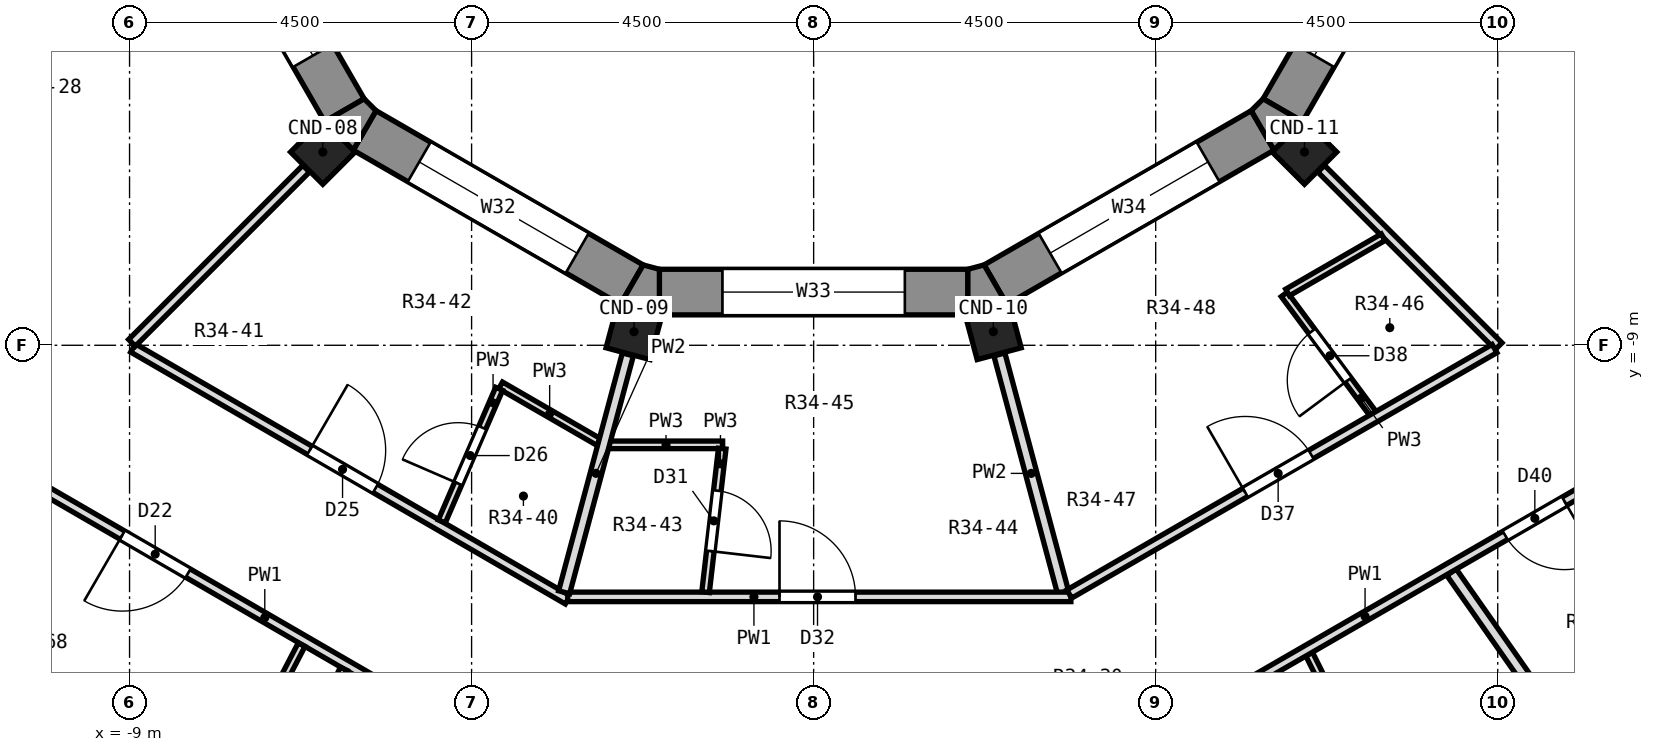
"""IFC4 building model, lengths in metres.
Left out: names, types, materials, properties, quantities, classifications, styles, units other than length and angle.
Written with IfcOpenShell. Run it as: python <this file> out.ifc"""

import sys

from ifc_helpers import new_model, si_unit, direction, frame, frame_2d, origin, origin_2d, place, context, subcontext, project, spatial, polyline, rectangle, outline, extrude, element, fill, save


model = new_model("IFC4")
c1 = context("Model", 3, precision=1e-05, world=origin(), true_north=direction((0.0, 1.0)))
c2 = subcontext(c1, "Body", "Model", "MODEL_VIEW")
j1 = project(units=[si_unit("LENGTHUNIT", "METRE"), si_unit("PLANEANGLEUNIT", "RADIAN")], contexts=[c1])
p1 = place(None, origin())
s1 = spatial("IfcSite", under=j1, at=p1, CompositionType="ELEMENT")
p2 = place(p1, origin())
s2 = spatial("IfcBuilding", under=s1, at=p2, CompositionType="ELEMENT")
p3 = place(p2, frame((0.0, 0.0, 239.6)))
s3 = spatial("IfcBuildingStorey", under=s2, at=p3, CompositionType="ELEMENT", Elevation=239.6)
for number, where, z_axis, x_axis in (
    (1, (-6.458, -6.458, 0.0), (0.0, 0.0, 1.0), (-0.707, -0.707, 0.0)),
    (2, (-2.364, -8.821, 0.0), (0.0, 0.0, 1.0), (-0.259, -0.966, 0.0)),
    (3, (2.364, -8.821, 0.0), (0.0, 0.0, 1.0), (0.259, -0.966, 0.0)),
    (4, (6.458, -6.458, 0.0), (0.0, 0.0, 1.0), (0.707, -0.707, 0.0)),
):
    element("IfcColumn", number, at=place(p3, frame(where, z_axis=z_axis, x_axis=x_axis)), inside=s3, PredefinedType="COLUMN", context=c2, shape_type="SweptSolid", body=[
        extrude(rectangle(XDim=0.6, YDim=0.6, at=origin_2d()), origin(), (0.0, 0.0, 1.0), 3.3),
    ])
p4 = place(p3, frame((-8.203, -2.393, 0.0), z_axis=(0.0, 0.0, 1.0), x_axis=(0.499994954979, -0.866028316509, 0.0)))
e5 = element("IfcWall", 5, at=p4, inside=s3, PredefinedType="SOLIDWALL", context=c2, shape_type="SweptSolid", body=[
    extrude(rectangle(XDim=4.059, YDim=0.6, at=frame_2d((2.029, 0.0))), origin(), (0.0, 0.0, 1.0), 2.9),
])
p5 = place(p4, frame((0.829, 0.0, 0.9)))
e6 = element("IfcOpeningElement", 6, at=p5, cuts=e5, PredefinedType="OPENING", context=c2, shape_type="SweptSolid", body=[
    extrude(rectangle(XDim=2.4, YDim=1.8, at=frame_2d((1.2, 0.9))), frame((0.0, 0.312, 0.0), z_axis=(0.0, -1.0, 0.0), x_axis=(1.0, 0.0, 0.0)), (0.0, 0.0, 1.0), 0.624),
])
p6 = place(p3, frame((-5.907, -6.173, 0.0), z_axis=(0.0, 0.0, 1.0), x_axis=(0.866028316509, -0.499994954979, 0.0)))
e7 = element("IfcWall", 7, at=p6, inside=s3, PredefinedType="SOLIDWALL", context=c2, shape_type="SweptSolid", body=[
    extrude(rectangle(XDim=4.059, YDim=0.6, at=frame_2d((2.029, 0.0))), origin(), (0.0, 0.0, 1.0), 2.9),
])
p7 = place(p6, frame((0.829, 0.0, 0.9)))
e8 = element("IfcOpeningElement", 8, at=p7, cuts=e7, PredefinedType="OPENING", context=c2, shape_type="SweptSolid", body=[
    extrude(rectangle(XDim=2.4, YDim=1.8, at=frame_2d((1.2, 0.9))), frame((0.0, 0.312, 0.0), z_axis=(0.0, -1.0, 0.0), x_axis=(1.0, 0.0, 0.0)), (0.0, 0.0, 1.0), 0.624),
])
p8 = place(p3, frame((-2.029, -8.3, 0.0), z_axis=(0.0, 0.0, 1.0), x_axis=(1.0, 0.0, 0.0)))
e9 = element("IfcWall", 9, at=p8, inside=s3, PredefinedType="SOLIDWALL", context=c2, shape_type="SweptSolid", body=[
    extrude(rectangle(XDim=4.059, YDim=0.6, at=frame_2d((2.029, 0.0))), origin(), (0.0, 0.0, 1.0), 2.9),
])
p9 = place(p8, frame((0.829, 0.0, 0.9)))
e10 = element("IfcOpeningElement", 10, at=p9, cuts=e9, PredefinedType="OPENING", context=c2, shape_type="SweptSolid", body=[
    extrude(rectangle(XDim=2.4, YDim=1.8, at=frame_2d((1.2, 0.9))), frame((0.0, 0.312, 0.0), z_axis=(0.0, -1.0, 0.0), x_axis=(1.0, 0.0, 0.0)), (0.0, 0.0, 1.0), 0.624),
])
p10 = place(p3, frame((2.393, -8.203, 0.0), z_axis=(0.0, 0.0, 1.0), x_axis=(0.866028316509, 0.499994954979, 0.0)))
e11 = element("IfcWall", 11, at=p10, inside=s3, PredefinedType="SOLIDWALL", context=c2, shape_type="SweptSolid", body=[
    extrude(rectangle(XDim=4.059, YDim=0.6, at=frame_2d((2.029, 0.0))), origin(), (0.0, 0.0, 1.0), 2.9),
])
p11 = place(p10, frame((0.829, 0.0, 0.9)))
e12 = element("IfcOpeningElement", 12, at=p11, cuts=e11, PredefinedType="OPENING", context=c2, shape_type="SweptSolid", body=[
    extrude(rectangle(XDim=2.4, YDim=1.8, at=frame_2d((1.2, 0.9))), frame((0.0, 0.312, 0.0), z_axis=(0.0, -1.0, 0.0), x_axis=(1.0, 0.0, 0.0)), (0.0, 0.0, 1.0), 0.624),
])
p12 = place(p3, frame((6.173, -5.907, 0.0), z_axis=(0.0, 0.0, 1.0), x_axis=(0.499994954979, 0.866028316509, 0.0)))
e13 = element("IfcWall", 13, at=p12, inside=s3, PredefinedType="SOLIDWALL", context=c2, shape_type="SweptSolid", body=[
    extrude(rectangle(XDim=4.059, YDim=0.6, at=frame_2d((2.029, 0.0))), origin(), (0.0, 0.0, 1.0), 2.9),
])
p13 = place(p12, frame((0.829, 0.0, 0.9)))
e14 = element("IfcOpeningElement", 14, at=p13, cuts=e13, PredefinedType="OPENING", context=c2, shape_type="SweptSolid", body=[
    extrude(rectangle(XDim=2.4, YDim=1.8, at=frame_2d((1.2, 0.9))), frame((0.0, 0.312, 0.0), z_axis=(0.0, -1.0, 0.0), x_axis=(1.0, 0.0, 0.0)), (0.0, 0.0, 1.0), 0.624),
])
p14 = place(p3, origin())
e15 = element("IfcWall", 15, at=p14, inside=s3, PredefinedType="SOLIDWALL", context=c2, shape_type="SweptSolid", body=[
    extrude(outline(polyline([(-6.058, -6.433), (-5.758, -5.914), (-5.914, -5.758), (-6.433, -6.058), (-6.058, -6.433)])), origin(), (0.0, 0.0, 1.0), 2.9),
])
p15 = place(p3, origin())
e16 = element("IfcWall", 16, at=p15, inside=s3, PredefinedType="SOLIDWALL", context=c2, shape_type="SweptSolid", body=[
    extrude(outline(polyline([(-2.029, -8.6), (-2.029, -8.0), (-2.242, -7.943), (-2.542, -8.462), (-2.029, -8.6)])), origin(), (0.0, 0.0, 1.0), 2.9),
])
p16 = place(p3, origin())
e17 = element("IfcWall", 17, at=p16, inside=s3, PredefinedType="SOLIDWALL", context=c2, shape_type="SweptSolid", body=[
    extrude(outline(polyline([(2.542, -8.462), (2.242, -7.943), (2.029, -8.0), (2.029, -8.6), (2.542, -8.462)])), origin(), (0.0, 0.0, 1.0), 2.9),
])
p17 = place(p3, origin())
e18 = element("IfcWall", 18, at=p17, inside=s3, PredefinedType="SOLIDWALL", context=c2, shape_type="SweptSolid", body=[
    extrude(outline(polyline([(6.433, -6.058), (5.914, -5.758), (5.758, -5.914), (6.058, -6.433), (6.433, -6.058)])), origin(), (0.0, 0.0, 1.0), 2.9),
])
p18 = place(p3, frame((2.444, -9.121, 0.0), z_axis=(0.0, 0.0, 1.0), x_axis=(0.258356832743, -0.966049557205, 0.0)))
e19 = element("IfcWall", 19, at=p18, inside=s3, PredefinedType="PARTITIONING", context=c2, shape_type="SweptSolid", body=[
    extrude(rectangle(XDim=3.239, YDim=0.15, at=frame_2d((1.62, 0.0))), origin(), (0.0, 0.0, 1.0), 2.9),
])
p19 = place(p3, frame((6.519, -13.063, 0.0), z_axis=(0.0, 0.0, 1.0), x_axis=(0.446207639569, -0.894929462243, 0.0)))
e20 = element("IfcWall", 20, at=p19, inside=s3, PredefinedType="PARTITIONING", context=c2, shape_type="SweptSolid", body=[
    extrude(rectangle(XDim=2.039, YDim=0.1, at=frame_2d((1.02, 0.0))), origin(), (0.0, 0.0, 1.0), 2.9),
])
p20 = place(p3, frame((8.392, -11.985, 0.0), z_axis=(0.0, 0.0, 1.0), x_axis=(0.573619710388, -0.819121741779, 0.0)))
e21 = element("IfcWall", 21, at=p20, inside=s3, PredefinedType="PARTITIONING", context=c2, shape_type="SweptSolid", body=[
    extrude(rectangle(XDim=7.184, YDim=0.15, at=frame_2d((3.592, 0.0))), origin(), (0.0, 0.0, 1.0), 2.9),
])
p21 = place(p3, frame((6.192, -8.33, 0.0), z_axis=(0.0, 0.0, 1.0), x_axis=(0.596570512615, -0.802560666541, 0.0)))
e22 = element("IfcWall", 22, at=p21, inside=s3, PredefinedType="PARTITIONING", context=c2, shape_type="SweptSolid", body=[
    extrude(rectangle(XDim=1.951, YDim=0.1, at=frame_2d((0.976, 0.0))), origin(), (0.0, 0.0, 1.0), 2.9),
])
p22 = place(p21, frame((0.607, 0.0, 0.0)))
e23 = element("IfcOpeningElement", 23, at=p22, cuts=e22, PredefinedType="OPENING", context=c2, shape_type="SweptSolid", body=[
    extrude(rectangle(XDim=0.8, YDim=2.1, at=frame_2d((0.4, 1.05))), frame((0.0, 0.062, 0.0), z_axis=(0.0, -1.0, 0.0), x_axis=(1.0, 0.0, 0.0)), (0.0, 0.0, 1.0), 0.124),
])
p23 = place(p3, frame((6.677, -6.677, 0.0), z_axis=(0.0, 0.0, 1.0), x_axis=(0.707106781187, -0.707106781187, 0.0)))
e24 = element("IfcWall", 24, at=p23, inside=s3, PredefinedType="PARTITIONING", context=c2, shape_type="SweptSolid", body=[
    extrude(rectangle(XDim=3.302, YDim=0.125, at=frame_2d((1.651, 0.0))), origin(), (0.0, 0.0, 1.0), 2.9),
])
p24 = place(p3, frame((-10.618, -10.615, 0.0), z_axis=(0.0, 0.0, 1.0), x_axis=(0.865323364785, -0.501214000561, 0.0)))
e25 = element("IfcWall", 25, at=p24, inside=s3, PredefinedType="PARTITIONING", context=c2, shape_type="SweptSolid", body=[
    extrude(rectangle(XDim=7.851, YDim=0.125, at=frame_2d((3.926, 0.0))), origin(), (0.0, 0.0, 1.0), 2.9),
])
p25 = place(p24, frame((1.76, 0.0, 0.0)))
e26 = element("IfcOpeningElement", 26, at=p25, cuts=e25, PredefinedType="OPENING", context=c2, shape_type="SweptSolid", body=[
    extrude(rectangle(XDim=1.0, YDim=2.1, at=frame_2d((0.5, 1.05))), frame((0.0, 0.074, 0.0), z_axis=(0.0, -1.0, 0.0), x_axis=(1.0, 0.0, 0.0)), (0.0, 0.0, 1.0), 0.149),
])
p26 = place(p3, frame((-8.953, -9.036, 0.0), z_axis=(0.0, 0.0, 1.0), x_axis=(0.865185064951, -0.501452693068, 0.0)))
e27 = element("IfcWall", 27, at=p26, inside=s3, PredefinedType="PARTITIONING", context=c2, shape_type="SweptSolid", body=[
    extrude(rectangle(XDim=6.609, YDim=0.125, at=frame_2d((3.304, 0.0))), origin(), (0.0, 0.0, 1.0), 2.9),
])
p27 = place(p26, frame((2.685, 0.0, 0.0)))
e28 = element("IfcOpeningElement", 28, at=p27, cuts=e27, PredefinedType="OPENING", context=c2, shape_type="SweptSolid", body=[
    extrude(rectangle(XDim=1.0, YDim=2.1, at=frame_2d((0.5, 1.05))), frame((0.0, 0.074, 0.0), z_axis=(0.0, -1.0, 0.0), x_axis=(1.0, 0.0, 0.0)), (0.0, 0.0, 1.0), 0.149),
])
p28 = place(p3, frame((-4.118, -9.527, 0.0), z_axis=(0.0, 0.0, 1.0), x_axis=(0.865863495864, -0.500280327947, 0.0)))
e29 = element("IfcWall", 29, at=p28, inside=s3, PredefinedType="PARTITIONING", context=c2, shape_type="SweptSolid", body=[
    extrude(rectangle(XDim=1.49, YDim=0.1, at=frame_2d((0.745, 0.0))), origin(), (0.0, 0.0, 1.0), 2.9),
])
p29 = place(p3, frame((-3.236, -12.31, 0.0), z_axis=(0.0, 0.0, 1.0), x_axis=(1.0, 0.0, 0.0)))
e30 = element("IfcWall", 30, at=p29, inside=s3, PredefinedType="PARTITIONING", context=c2, shape_type="SweptSolid", body=[
    extrude(rectangle(XDim=6.62, YDim=0.125, at=frame_2d((3.31, 0.0))), origin(), (0.0, 0.0, 1.0), 2.9),
])
p30 = place(p29, frame((2.787, 0.0, 0.0)))
e31 = element("IfcOpeningElement", 31, at=p30, cuts=e30, PredefinedType="OPENING", context=c2, shape_type="SweptSolid", body=[
    extrude(rectangle(XDim=1.0, YDim=2.1, at=frame_2d((0.5, 1.05))), frame((0.0, 0.074, 0.0), z_axis=(0.0, -1.0, 0.0), x_axis=(1.0, 0.0, 0.0)), (0.0, 0.0, 1.0), 0.149),
])
p31 = place(p3, frame((-2.688, -10.31, 0.0), z_axis=(0.0, 0.0, 1.0), x_axis=(1.0, 0.0, 0.0)))
e32 = element("IfcWall", 32, at=p31, inside=s3, PredefinedType="PARTITIONING", context=c2, shape_type="SweptSolid", body=[
    extrude(rectangle(XDim=1.491, YDim=0.1, at=frame_2d((0.746, 0.0))), origin(), (0.0, 0.0, 1.0), 2.9),
])
p32 = place(p3, frame((3.942, -14.479, 0.0), z_axis=(0.0, 0.0, 1.0), x_axis=(0.866021382195, 0.500006965533, 0.0)))
e33 = element("IfcWall", 33, at=p32, inside=s3, PredefinedType="PARTITIONING", context=c2, shape_type="SweptSolid", body=[
    extrude(rectangle(XDim=7.651, YDim=0.125, at=frame_2d((3.825, 0.0))), origin(), (0.0, 0.0, 1.0), 2.9),
])
p33 = place(p32, frame((5.954, 0.0, 0.0)))
e34 = element("IfcOpeningElement", 34, at=p33, cuts=e33, PredefinedType="OPENING", context=c2, shape_type="SweptSolid", body=[
    extrude(rectangle(XDim=0.9, YDim=2.1, at=frame_2d((0.45, 1.05))), frame((0.0, 0.074, 0.0), z_axis=(0.0, -1.0, 0.0), x_axis=(1.0, 0.0, 0.0)), (0.0, 0.0, 1.0), 0.149),
])
p34 = place(p3, frame((3.363, -12.272, 0.0), z_axis=(0.0, 0.0, 1.0), x_axis=(0.866083637917, 0.499899121956, 0.0)))
e35 = element("IfcWall", 35, at=p34, inside=s3, PredefinedType="PARTITIONING", context=c2, shape_type="SweptSolid", body=[
    extrude(rectangle(XDim=6.46, YDim=0.125, at=frame_2d((3.23, 0.0))), origin(), (0.0, 0.0, 1.0), 2.9),
])
p35 = place(p34, frame((2.673, 0.0, 0.0)))
e36 = element("IfcOpeningElement", 36, at=p35, cuts=e35, PredefinedType="OPENING", context=c2, shape_type="SweptSolid", body=[
    extrude(rectangle(XDim=1.0, YDim=2.1, at=frame_2d((0.5, 1.05))), frame((0.0, 0.074, 0.0), z_axis=(0.0, -1.0, 0.0), x_axis=(1.0, 0.0, 0.0)), (0.0, 0.0, 1.0), 0.149),
])
p36 = place(p3, frame((6.235, -8.305, 0.0), z_axis=(0.0, 0.0, 1.0), x_axis=(0.865874781837, 0.500260794165, 0.0)))
e37 = element("IfcWall", 37, at=p36, inside=s3, PredefinedType="PARTITIONING", context=c2, shape_type="SweptSolid", body=[
    extrude(rectangle(XDim=1.452, YDim=0.1, at=frame_2d((0.726, 0.0))), origin(), (0.0, 0.0, 1.0), 2.9),
])
p37 = place(p3, frame((-8.968, -8.968, 0.0), z_axis=(0.0, 0.0, 1.0), x_axis=(0.707106781187, 0.707106781187, 0.0)))
e38 = element("IfcWall", 38, at=p37, inside=s3, PredefinedType="PARTITIONING", context=c2, shape_type="SweptSolid", body=[
    extrude(rectangle(XDim=3.24, YDim=0.125, at=frame_2d((1.62, 0.0))), origin(), (0.0, 0.0, 1.0), 2.9),
])
p38 = place(p3, frame((-8.25, -15.847, 0.0), z_axis=(0.0, 0.0, 1.0), x_axis=(0.461751333764, 0.887009416955, 0.0)))
e39 = element("IfcWall", 39, at=p38, inside=s3, PredefinedType="PARTITIONING", context=c2, shape_type="SweptSolid", body=[
    extrude(rectangle(XDim=3.278, YDim=0.1, at=frame_2d((1.639, 0.0))), origin(), (0.0, 0.0, 1.0), 2.9),
])
p39 = place(p3, frame((-7.026, -15.066, 0.0), z_axis=(0.0, 0.0, 1.0), x_axis=(0.422771582019, 0.906236276827, 0.0)))
e40 = element("IfcWall", 40, at=p39, inside=s3, PredefinedType="PARTITIONING", context=c2, shape_type="SweptSolid", body=[
    extrude(rectangle(XDim=1.995, YDim=0.1, at=frame_2d((0.998, 0.0))), origin(), (0.0, 0.0, 1.0), 2.9),
])
p40 = place(p3, frame((-4.892, -11.318, 0.0), z_axis=(0.0, 0.0, 1.0), x_axis=(0.396785383472, 0.917911411555, 0.0)))
e41 = element("IfcWall", 41, at=p40, inside=s3, PredefinedType="PARTITIONING", context=c2, shape_type="SweptSolid", body=[
    extrude(rectangle(XDim=1.901, YDim=0.1, at=frame_2d((0.95, 0.0))), origin(), (0.0, 0.0, 1.0), 2.9),
])
p41 = place(p40, frame((0.544, 0.0, 0.0)))
e42 = element("IfcOpeningElement", 42, at=p41, cuts=e41, PredefinedType="OPENING", context=c2, shape_type="SweptSolid", body=[
    extrude(rectangle(XDim=0.8, YDim=2.1, at=frame_2d((0.4, 1.05))), frame((0.0, 0.062, 0.0), z_axis=(0.0, -1.0, 0.0), x_axis=(1.0, 0.0, 0.0)), (0.0, 0.0, 1.0), 0.124),
])
p42 = place(p3, frame((-3.282, -12.25, 0.0), z_axis=(0.0, 0.0, 1.0), x_axis=(0.258727295272, 0.965950405912, 0.0)))
e43 = element("IfcWall", 43, at=p42, inside=s3, PredefinedType="PARTITIONING", context=c2, shape_type="SweptSolid", body=[
    extrude(rectangle(XDim=3.24, YDim=0.15, at=frame_2d((1.62, 0.0))), origin(), (0.0, 0.0, 1.0), 2.9),
])
p43 = place(p3, frame((-1.422, -12.248, 0.0), z_axis=(0.0, 0.0, 1.0), x_axis=(0.115209091431, 0.993341263238, 0.0)))
e44 = element("IfcWall", 44, at=p43, inside=s3, PredefinedType="PARTITIONING", context=c2, shape_type="SweptSolid", body=[
    extrude(rectangle(XDim=1.901, YDim=0.1, at=frame_2d((0.95, 0.0))), origin(), (0.0, 0.0, 1.0), 2.9),
])
p44 = place(p43, frame((0.544, 0.0, 0.0)))
e45 = element("IfcOpeningElement", 45, at=p44, cuts=e44, PredefinedType="OPENING", context=c2, shape_type="SweptSolid", body=[
    extrude(rectangle(XDim=0.8, YDim=2.1, at=frame_2d((0.4, 1.05))), frame((0.0, 0.062, 0.0), z_axis=(0.0, -1.0, 0.0), x_axis=(1.0, 0.0, 0.0)), (0.0, 0.0, 1.0), 0.124),
])
p45 = place(p5, origin())
e46 = element("IfcWindow", 46, at=p45, inside=s3, PartitioningType="SINGLE_PANEL", PredefinedType="WINDOW", context=c2, shape_type="SweptSolid", body=[
    extrude(rectangle(XDim=2.4, YDim=1.8, at=frame_2d((1.2, 0.9))), frame((0.0, -0.12, 0.0), z_axis=(0.0, -1.0, 0.0), x_axis=(1.0, 0.0, 0.0)), (0.0, 0.0, 1.0), 0.06),
])
fill(e6, e46)
p46 = place(p7, origin())
e47 = element("IfcWindow", 47, at=p46, inside=s3, PartitioningType="SINGLE_PANEL", PredefinedType="WINDOW", context=c2, shape_type="SweptSolid", body=[
    extrude(rectangle(XDim=2.4, YDim=1.8, at=frame_2d((1.2, 0.9))), frame((0.0, -0.12, 0.0), z_axis=(0.0, -1.0, 0.0), x_axis=(1.0, 0.0, 0.0)), (0.0, 0.0, 1.0), 0.06),
])
fill(e8, e47)
p47 = place(p9, origin())
e48 = element("IfcWindow", 48, at=p47, inside=s3, PartitioningType="SINGLE_PANEL", PredefinedType="WINDOW", context=c2, shape_type="SweptSolid", body=[
    extrude(rectangle(XDim=2.4, YDim=1.8, at=frame_2d((1.2, 0.9))), frame((0.0, -0.12, 0.0), z_axis=(0.0, -1.0, 0.0), x_axis=(1.0, 0.0, 0.0)), (0.0, 0.0, 1.0), 0.06),
])
fill(e10, e48)
p48 = place(p11, origin())
e49 = element("IfcWindow", 49, at=p48, inside=s3, PartitioningType="SINGLE_PANEL", PredefinedType="WINDOW", context=c2, shape_type="SweptSolid", body=[
    extrude(rectangle(XDim=2.4, YDim=1.8, at=frame_2d((1.2, 0.9))), frame((0.0, -0.12, 0.0), z_axis=(0.0, -1.0, 0.0), x_axis=(1.0, 0.0, 0.0)), (0.0, 0.0, 1.0), 0.06),
])
fill(e12, e49)
p49 = place(p13, origin())
e50 = element("IfcWindow", 50, at=p49, inside=s3, PartitioningType="SINGLE_PANEL", PredefinedType="WINDOW", context=c2, shape_type="SweptSolid", body=[
    extrude(rectangle(XDim=2.4, YDim=1.8, at=frame_2d((1.2, 0.9))), frame((0.0, -0.12, 0.0), z_axis=(0.0, -1.0, 0.0), x_axis=(1.0, 0.0, 0.0)), (0.0, 0.0, 1.0), 0.06),
])
fill(e14, e50)
p50 = place(p25, frame((1.0, 0.0, 0.0), z_axis=(0.0, 0.0, 1.0), x_axis=(-1.0, 0.0, 0.0)))
e51 = element("IfcDoor", 51, at=p50, inside=s3, OperationType="SINGLE_SWING_RIGHT", PredefinedType="DOOR", context=c2, shape_type="SweptSolid", body=[
    extrude(rectangle(XDim=1.0, YDim=2.1, at=frame_2d((0.5, 1.05))), frame((0.0, 0.025, 0.0), z_axis=(0.0, -1.0, 0.0), x_axis=(1.0, 0.0, 0.0)), (0.0, 0.0, 1.0), 0.05),
])
fill(e26, e51)
p51 = place(p27, origin())
e52 = element("IfcDoor", 52, at=p51, inside=s3, OperationType="SINGLE_SWING_LEFT", PredefinedType="DOOR", context=c2, shape_type="SweptSolid", body=[
    extrude(rectangle(XDim=1.0, YDim=2.1, at=frame_2d((0.5, 1.05))), frame((0.0, 0.025, 0.0), z_axis=(0.0, -1.0, 0.0), x_axis=(1.0, 0.0, 0.0)), (0.0, 0.0, 1.0), 0.05),
])
fill(e28, e52)
p52 = place(p41, origin())
e53 = element("IfcDoor", 53, at=p52, inside=s3, OperationType="SINGLE_SWING_LEFT", PredefinedType="DOOR", context=c2, shape_type="SweptSolid", body=[
    extrude(rectangle(XDim=0.8, YDim=2.1, at=frame_2d((0.4, 1.05))), frame((0.0, 0.025, 0.0), z_axis=(0.0, -1.0, 0.0), x_axis=(1.0, 0.0, 0.0)), (0.0, 0.0, 1.0), 0.05),
])
fill(e42, e53)
p53 = place(p44, frame((0.8, 0.0, 0.0), z_axis=(0.0, 0.0, 1.0), x_axis=(-1.0, 0.0, 0.0)))
e54 = element("IfcDoor", 54, at=p53, inside=s3, OperationType="SINGLE_SWING_RIGHT", PredefinedType="DOOR", context=c2, shape_type="SweptSolid", body=[
    extrude(rectangle(XDim=0.8, YDim=2.1, at=frame_2d((0.4, 1.05))), frame((0.0, 0.025, 0.0), z_axis=(0.0, -1.0, 0.0), x_axis=(1.0, 0.0, 0.0)), (0.0, 0.0, 1.0), 0.05),
])
fill(e45, e54)
p54 = place(p30, origin())
e55 = element("IfcDoor", 55, at=p54, inside=s3, OperationType="SINGLE_SWING_LEFT", PredefinedType="DOOR", context=c2, shape_type="SweptSolid", body=[
    extrude(rectangle(XDim=1.0, YDim=2.1, at=frame_2d((0.5, 1.05))), frame((0.0, 0.025, 0.0), z_axis=(0.0, -1.0, 0.0), x_axis=(1.0, 0.0, 0.0)), (0.0, 0.0, 1.0), 0.05),
])
fill(e31, e55)
p55 = place(p35, origin())
e56 = element("IfcDoor", 56, at=p55, inside=s3, OperationType="SINGLE_SWING_LEFT", PredefinedType="DOOR", context=c2, shape_type="SweptSolid", body=[
    extrude(rectangle(XDim=1.0, YDim=2.1, at=frame_2d((0.5, 1.05))), frame((0.0, 0.025, 0.0), z_axis=(0.0, -1.0, 0.0), x_axis=(1.0, 0.0, 0.0)), (0.0, 0.0, 1.0), 0.05),
])
fill(e36, e56)
p56 = place(p22, frame((0.8, 0.0, 0.0), z_axis=(0.0, 0.0, 1.0), x_axis=(-1.0, 0.0, 0.0)))
e57 = element("IfcDoor", 57, at=p56, inside=s3, OperationType="SINGLE_SWING_LEFT", PredefinedType="DOOR", context=c2, shape_type="SweptSolid", body=[
    extrude(rectangle(XDim=0.8, YDim=2.1, at=frame_2d((0.4, 1.05))), frame((0.0, 0.025, 0.0), z_axis=(0.0, -1.0, 0.0), x_axis=(1.0, 0.0, 0.0)), (0.0, 0.0, 1.0), 0.05),
])
fill(e23, e57)
p57 = place(p33, frame((0.9, 0.0, 0.0), z_axis=(0.0, 0.0, 1.0), x_axis=(-1.0, 0.0, 0.0)))
e58 = element("IfcDoor", 58, at=p57, inside=s3, OperationType="SINGLE_SWING_LEFT", PredefinedType="DOOR", context=c2, shape_type="SweptSolid", body=[
    extrude(rectangle(XDim=0.9, YDim=2.1, at=frame_2d((0.45, 1.05))), frame((0.0, 0.025, 0.0), z_axis=(0.0, -1.0, 0.0), x_axis=(1.0, 0.0, 0.0)), (0.0, 0.0, 1.0), 0.05),
])
fill(e34, e58)
save(model, sys.argv[1])
